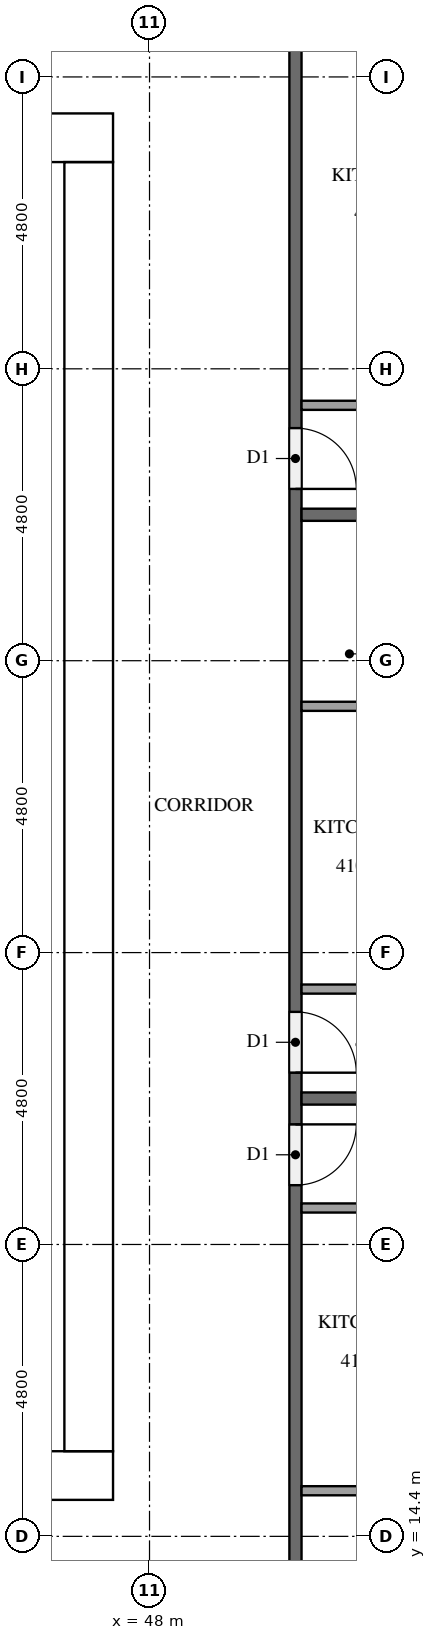
"""IFC4 building model, lengths in metres.
Left out: names, types, materials, properties, quantities, classifications, styles, units other than length and angle.
Written with IfcOpenShell. Run it as: python <this file> out.ifc"""

import sys

from ifc_helpers import new_model, si_unit, direction, frame, frame_2d, origin, place, context, subcontext, project, spatial, rectangle, extrude, element, fill, save


model = new_model("IFC4")
c1 = context("Model", 3, precision=1e-05, world=origin(), true_north=direction((0.0, 1.0)))
c2 = subcontext(c1, "Body", "Model", "MODEL_VIEW")
j1 = project(units=[si_unit("LENGTHUNIT", "METRE"), si_unit("PLANEANGLEUNIT", "RADIAN")], contexts=[c1])
p1 = place(None, origin())
s1 = spatial("IfcSite", under=j1, at=p1, CompositionType="ELEMENT")
p2 = place(p1, origin())
s2 = spatial("IfcBuilding", under=s1, at=p2, CompositionType="ELEMENT")
p3 = place(p2, frame((0.0, 0.0, 159.5)))
s3 = spatial("IfcBuildingStorey", under=s2, at=p3, CompositionType="ELEMENT", Elevation=159.5)
p4 = place(p3, frame((15.0, 15.4, 0.0), z_axis=(0.0, 0.0, 1.0), x_axis=(1.0, 0.0, 0.0)))
e1 = element("IfcWall", 1, at=p4, inside=s3, PredefinedType="SHEAR", context=c2, shape_type="SweptSolid", body=[
    extrude(rectangle(XDim=32.4, YDim=0.8, at=frame_2d((16.2, 0.0))), origin(), (0.0, 0.0, 1.0), 3.2),
])
p5 = place(p4, frame((15.3, 0.0, 0.0)))
e2 = element("IfcOpeningElement", 2, at=p5, cuts=e1, PredefinedType="OPENING", context=c2, shape_type="SweptSolid", body=[
    extrude(rectangle(XDim=1.8, YDim=2.1, at=frame_2d((0.9, 1.05))), frame((0.0, 0.41, 0.0), z_axis=(0.0, -1.0, 0.0), x_axis=(1.0, 0.0, 0.0)), (0.0, 0.0, 1.0), 0.82),
])
p6 = place(p3, frame((15.0, 37.4, 0.0), z_axis=(0.0, 0.0, 1.0), x_axis=(1.0, 0.0, 0.0)))
e3 = element("IfcWall", 3, at=p6, inside=s3, PredefinedType="SHEAR", context=c2, shape_type="SweptSolid", body=[
    extrude(rectangle(XDim=32.4, YDim=0.8, at=frame_2d((16.2, 0.0))), origin(), (0.0, 0.0, 1.0), 3.2),
])
p7 = place(p6, frame((15.3, 0.0, 0.0)))
e4 = element("IfcOpeningElement", 4, at=p7, cuts=e3, PredefinedType="OPENING", context=c2, shape_type="SweptSolid", body=[
    extrude(rectangle(XDim=1.8, YDim=2.1, at=frame_2d((0.9, 1.05))), frame((0.0, 0.41, 0.0), z_axis=(0.0, -1.0, 0.0), x_axis=(1.0, 0.0, 0.0)), (0.0, 0.0, 1.0), 0.82),
])
p8 = place(p6, frame((1.51, 0.0, 0.0)))
e5 = element("IfcOpeningElement", 5, at=p8, cuts=e3, PredefinedType="OPENING", context=c2, shape_type="SweptSolid", body=[
    extrude(rectangle(XDim=1.0, YDim=2.1, at=frame_2d((0.5, 1.05))), frame((0.0, 0.41, 0.0), z_axis=(0.0, -1.0, 0.0), x_axis=(1.0, 0.0, 0.0)), (0.0, 0.0, 1.0), 0.82),
])
p9 = place(p6, frame((5.11, 0.0, 0.0)))
e6 = element("IfcOpeningElement", 6, at=p9, cuts=e3, PredefinedType="OPENING", context=c2, shape_type="SweptSolid", body=[
    extrude(rectangle(XDim=1.0, YDim=2.1, at=frame_2d((0.5, 1.05))), frame((0.0, 0.41, 0.0), z_axis=(0.0, -1.0, 0.0), x_axis=(1.0, 0.0, 0.0)), (0.0, 0.0, 1.0), 0.82),
])
p10 = place(p3, frame((47.0, 15.8, 0.0), z_axis=(0.0, 0.0, 1.0), x_axis=(0.0, 1.0, 0.0)))
e7 = element("IfcWall", 7, at=p10, inside=s3, PredefinedType="SHEAR", context=c2, shape_type="SweptSolid", body=[
    extrude(rectangle(XDim=21.2, YDim=0.8, at=frame_2d((10.6, 0.0))), origin(), (0.0, 0.0, 1.0), 3.2),
])
p11 = place(p10, frame((10.3, 0.0, 0.0)))
e8 = element("IfcOpeningElement", 8, at=p11, cuts=e7, PredefinedType="OPENING", context=c2, shape_type="SweptSolid", body=[
    extrude(rectangle(XDim=1.2, YDim=2.1, at=frame_2d((0.6, 1.05))), frame((0.0, 0.41, 0.0), z_axis=(0.0, -1.0, 0.0), x_axis=(1.0, 0.0, 0.0)), (0.0, 0.0, 1.0), 0.82),
])
p12 = place(p3, frame((50.4, 40.7, 0.0), z_axis=(0.0, 0.0, 1.0), x_axis=(0.0, -1.0, 0.0)))
e9 = element("IfcWall", 9, at=p12, inside=s3, PredefinedType="PARTITIONING", context=c2, shape_type="SweptSolid", body=[
    extrude(rectangle(XDim=28.6, YDim=0.2, at=frame_2d((14.3, 0.0))), origin(), (0.0, 0.0, 1.0), 3.2),
])
p13 = place(p12, frame((19.525, 0.0, 0.0)))
e10 = element("IfcOpeningElement", 10, at=p13, cuts=e9, PredefinedType="OPENING", context=c2, shape_type="SweptSolid", body=[
    extrude(rectangle(XDim=1.0, YDim=2.1, at=frame_2d((0.5, 1.05))), frame((0.0, 0.11, 0.0), z_axis=(0.0, -1.0, 0.0), x_axis=(1.0, 0.0, 0.0)), (0.0, 0.0, 1.0), 0.22),
])
p14 = place(p12, frame((17.675, 0.0, 0.0)))
e11 = element("IfcOpeningElement", 11, at=p14, cuts=e9, PredefinedType="OPENING", context=c2, shape_type="SweptSolid", body=[
    extrude(rectangle(XDim=1.0, YDim=2.1, at=frame_2d((0.5, 1.05))), frame((0.0, 0.11, 0.0), z_axis=(0.0, -1.0, 0.0), x_axis=(1.0, 0.0, 0.0)), (0.0, 0.0, 1.0), 0.22),
])
p15 = place(p12, frame((8.075, 0.0, 0.0)))
e12 = element("IfcOpeningElement", 12, at=p15, cuts=e9, PredefinedType="OPENING", context=c2, shape_type="SweptSolid", body=[
    extrude(rectangle(XDim=1.0, YDim=2.1, at=frame_2d((0.5, 1.05))), frame((0.0, 0.11, 0.0), z_axis=(0.0, -1.0, 0.0), x_axis=(1.0, 0.0, 0.0)), (0.0, 0.0, 1.0), 0.22),
])
for number, where, z_axis, x_axis in (
    (13, (50.5, 21.6, 0.0), (0.0, 0.0, 1.0), (1.0, 0.0, 0.0)),
    (14, (50.5, 31.2, 0.0), (0.0, 0.0, 1.0), (1.0, 0.0, 0.0)),
):
    element("IfcWall", number, at=place(p3, frame(where, z_axis=z_axis, x_axis=x_axis)), inside=s3, PredefinedType="PARTITIONING", context=c2, shape_type="SweptSolid", body=[
        extrude(rectangle(XDim=7.0, YDim=0.2, at=frame_2d((3.5, 0.0))), origin(), (0.0, 0.0, 1.0), 3.2),
    ])
p16 = place(p3, frame((50.5, 15.15, 0.0), z_axis=(0.0, 0.0, 1.0), x_axis=(1.0, 0.0, 0.0)))
e15 = element("IfcWall", 15, at=p16, inside=s3, PredefinedType="PARTITIONING", context=c2, shape_type="SweptSolid", body=[
    extrude(rectangle(XDim=1.925, YDim=0.15, at=frame_2d((0.962, 0.0))), origin(), (0.0, 0.0, 1.0), 3.2),
])
p17 = place(p3, frame((50.5, 19.8, 0.0), z_axis=(0.0, 0.0, 1.0), x_axis=(1.0, 0.0, 0.0)))
e16 = element("IfcWall", 16, at=p17, inside=s3, PredefinedType="PARTITIONING", context=c2, shape_type="SweptSolid", body=[
    extrude(rectangle(XDim=2.075, YDim=0.15, at=frame_2d((1.038, 0.0))), origin(), (0.0, 0.0, 1.0), 3.2),
])
p18 = place(p3, frame((50.5, 28.05, 0.0), z_axis=(0.0, 0.0, 1.0), x_axis=(1.0, 0.0, 0.0)))
e17 = element("IfcWall", 17, at=p18, inside=s3, PredefinedType="PARTITIONING", context=c2, shape_type="SweptSolid", body=[
    extrude(rectangle(XDim=1.775, YDim=0.15, at=frame_2d((0.887, 0.0))), origin(), (0.0, 0.0, 1.0), 3.2),
])
p19 = place(p3, frame((50.5, 23.4, 0.0), z_axis=(0.0, 0.0, 1.0), x_axis=(1.0, 0.0, 0.0)))
e18 = element("IfcWall", 18, at=p19, inside=s3, PredefinedType="PARTITIONING", context=c2, shape_type="SweptSolid", body=[
    extrude(rectangle(XDim=1.925, YDim=0.15, at=frame_2d((0.962, 0.0))), origin(), (0.0, 0.0, 1.0), 3.2),
])
p20 = place(p3, frame((50.5, 33.0, 0.0), z_axis=(0.0, 0.0, 1.0), x_axis=(1.0, 0.0, 0.0)))
e19 = element("IfcWall", 19, at=p20, inside=s3, PredefinedType="PARTITIONING", context=c2, shape_type="SweptSolid", body=[
    extrude(rectangle(XDim=2.525, YDim=0.15, at=frame_2d((1.262, 0.0))), origin(), (0.0, 0.0, 1.0), 3.2),
])
p21 = place(p11, origin())
e20 = element("IfcDoor", 20, at=p21, inside=s3, OperationType="SINGLE_SWING_LEFT", PredefinedType="DOOR", context=c2, shape_type="SweptSolid", body=[
    extrude(rectangle(XDim=1.2, YDim=2.1, at=frame_2d((0.6, 1.05))), frame((0.0, 0.025, 0.0), z_axis=(0.0, -1.0, 0.0), x_axis=(1.0, 0.0, 0.0)), (0.0, 0.0, 1.0), 0.05),
])
fill(e8, e20)
p22 = place(p13, origin())
e21 = element("IfcDoor", 21, at=p22, inside=s3, OperationType="SINGLE_SWING_LEFT", PredefinedType="DOOR", context=c2, shape_type="SweptSolid", body=[
    extrude(rectangle(XDim=1.0, YDim=2.1, at=frame_2d((0.5, 1.05))), frame((0.0, 0.025, 0.0), z_axis=(0.0, -1.0, 0.0), x_axis=(1.0, 0.0, 0.0)), (0.0, 0.0, 1.0), 0.05),
])
fill(e10, e21)
p23 = place(p14, origin())
e22 = element("IfcDoor", 22, at=p23, inside=s3, OperationType="SINGLE_SWING_RIGHT", PredefinedType="DOOR", context=c2, shape_type="SweptSolid", body=[
    extrude(rectangle(XDim=1.0, YDim=2.1, at=frame_2d((0.5, 1.05))), frame((0.0, 0.025, 0.0), z_axis=(0.0, -1.0, 0.0), x_axis=(1.0, 0.0, 0.0)), (0.0, 0.0, 1.0), 0.05),
])
fill(e11, e22)
p24 = place(p15, origin())
e23 = element("IfcDoor", 23, at=p24, inside=s3, OperationType="SINGLE_SWING_RIGHT", PredefinedType="DOOR", context=c2, shape_type="SweptSolid", body=[
    extrude(rectangle(XDim=1.0, YDim=2.1, at=frame_2d((0.5, 1.05))), frame((0.0, 0.025, 0.0), z_axis=(0.0, -1.0, 0.0), x_axis=(1.0, 0.0, 0.0)), (0.0, 0.0, 1.0), 0.05),
])
fill(e12, e23)
save(model, sys.argv[1])
